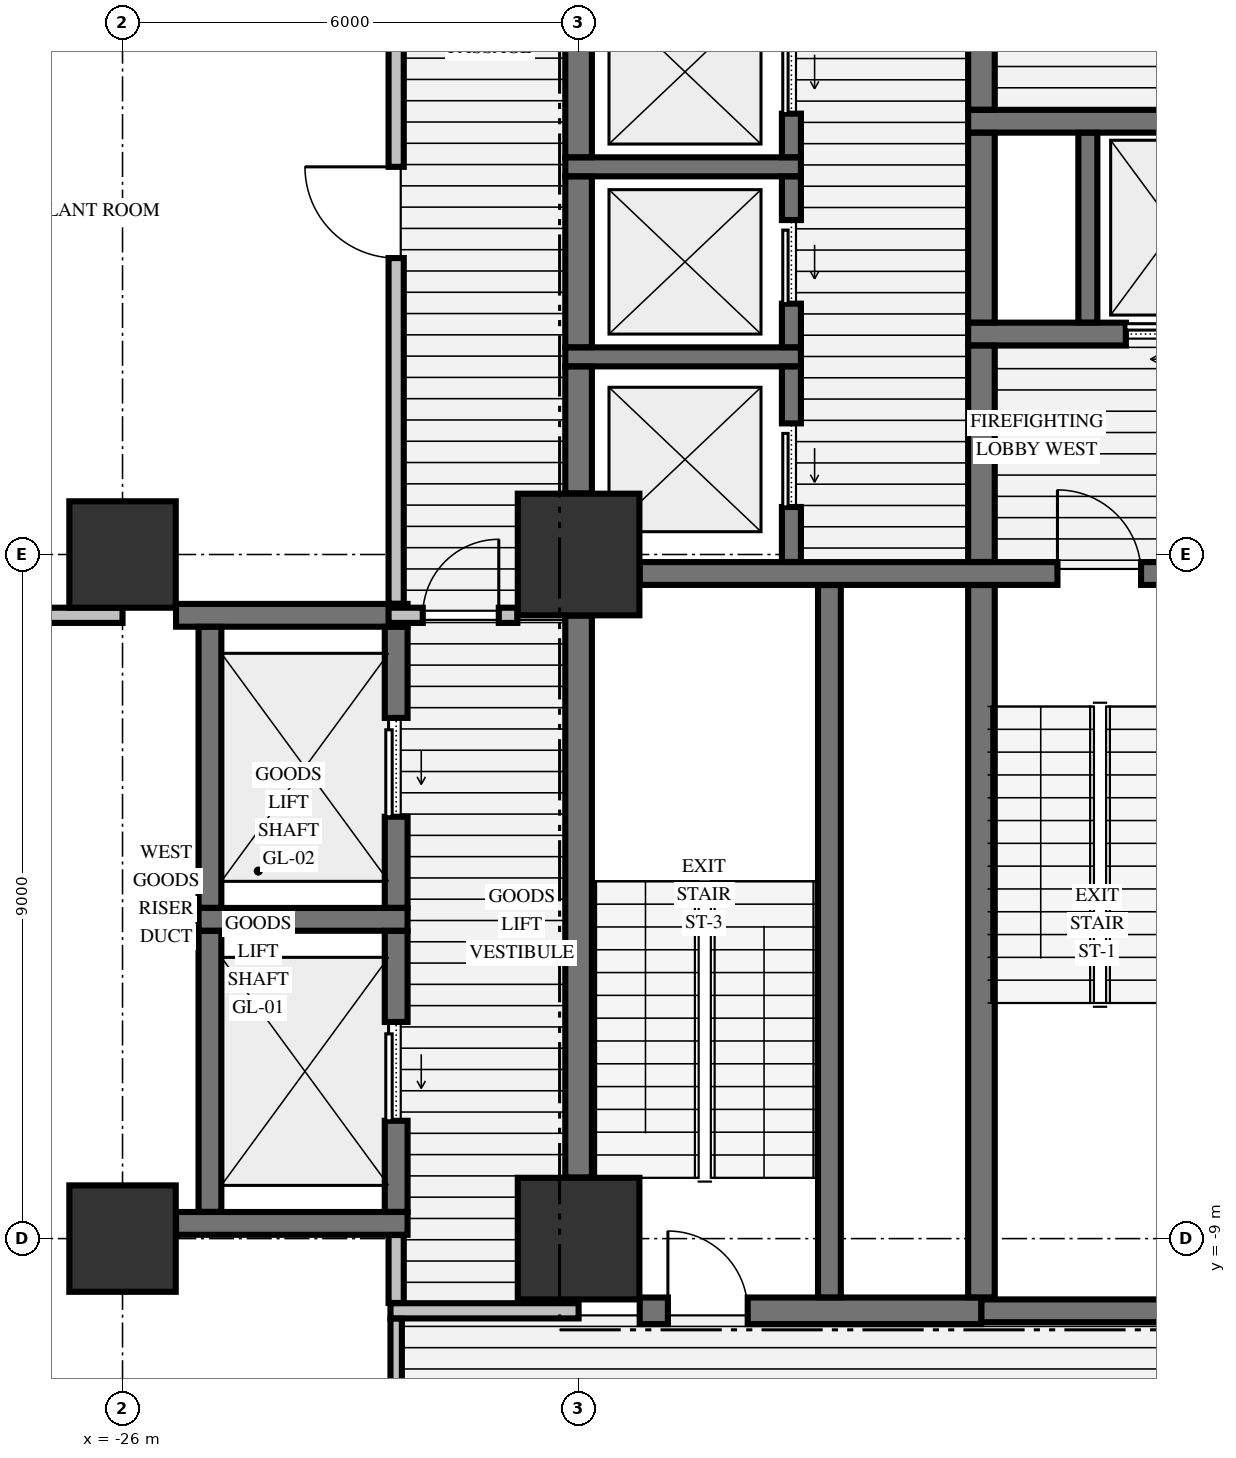
"""IFC4 building model, lengths in metres.
Left out: names, types, materials, properties, quantities, classifications, styles, units other than length and angle.
Written with IfcOpenShell. Run it as: python <this file> out.ifc"""

import sys

from ifc_helpers import new_model, si_unit, direction, frame, frame_2d, origin, origin_2d, place, context, subcontext, project, spatial, rectangle, extrude, element, fill, save


model = new_model("IFC4")
c1 = context("Model", 3, precision=1e-05, world=origin(), true_north=direction((0.0, 1.0)))
c2 = subcontext(c1, "Body", "Model", "MODEL_VIEW")
j1 = project(units=[si_unit("LENGTHUNIT", "METRE"), si_unit("PLANEANGLEUNIT", "RADIAN")], contexts=[c1])
p1 = place(None, origin())
s1 = spatial("IfcSite", under=j1, at=p1, CompositionType="ELEMENT")
p2 = place(p1, origin())
s2 = spatial("IfcBuilding", under=s1, at=p2, CompositionType="ELEMENT")
p3 = place(p2, frame((0.0, 0.0, -9.1)))
s3 = spatial("IfcBuildingStorey", under=s2, at=p3, CompositionType="ELEMENT", Elevation=-9.1)
for number, where, z_axis, x_axis in (
    (1, (-26.0, -9.0, -0.45), (0.0, 0.0, 1.0), (1.0, 0.0, 0.0)),
    (2, (-26.0, 0.0, -0.45), (0.0, 0.0, 1.0), (1.0, 0.0, 0.0)),
):
    element("IfcColumn", number, at=place(p3, frame(where, z_axis=z_axis, x_axis=x_axis)), inside=s3, PredefinedType="COLUMN", context=c2, shape_type="SweptSolid", body=[
        extrude(rectangle(XDim=1.4, YDim=1.4, at=origin_2d()), origin(), (0.0, 0.0, 1.0), 4.65),
    ])
for number, where, z_axis, x_axis in (
    (3, (-20.0, -9.0, -0.45), (0.0, 0.0, 1.0), (1.0, 0.0, 0.0)),
    (4, (-20.0, 0.0, -0.45), (0.0, 0.0, 1.0), (1.0, 0.0, 0.0)),
):
    element("IfcColumn", number, at=place(p3, frame(where, z_axis=z_axis, x_axis=x_axis)), inside=s3, PredefinedType="COLUMN", context=c2, shape_type="SweptSolid", body=[
        extrude(rectangle(XDim=1.6, YDim=1.6, at=origin_2d()), origin(), (0.0, 0.0, 1.0), 4.65),
    ])
p4 = place(p3, frame((-19.196, -9.95, 0.0), z_axis=(0.0, 0.0, 1.0), x_axis=(1.0, 0.0, 0.0)))
e5 = element("IfcWall", 5, at=p4, inside=s3, PredefinedType="SHEAR", context=c2, shape_type="SweptSolid", body=[
    extrude(rectangle(XDim=4.496, YDim=0.35, at=frame_2d((2.248, 0.0))), origin(), (0.0, 0.0, 1.0), 4.2),
])
p5 = place(p4, frame((0.371, 0.0, 0.0)))
e6 = element("IfcOpeningElement", 6, at=p5, cuts=e5, PredefinedType="OPENING", context=c2, shape_type="SweptSolid", body=[
    extrude(rectangle(XDim=1.05, YDim=2.15, at=frame_2d((0.525, 1.075))), frame((0.0, 0.185, 0.0), z_axis=(0.0, -1.0, 0.0), x_axis=(1.0, 0.0, 0.0)), (0.0, 0.0, 1.0), 0.37),
])
p6 = place(p3, frame((-14.7, -9.95, 0.0), z_axis=(0.0, 0.0, 1.0), x_axis=(1.0, 0.0, 0.0)))
e7 = element("IfcWall", 7, at=p6, inside=s3, PredefinedType="SHEAR", context=c2, shape_type="SweptSolid", body=[
    extrude(rectangle(XDim=3.85, YDim=0.3, at=frame_2d((1.925, 0.0))), origin(), (0.0, 0.0, 1.0), 4.2),
])
p7 = place(p3, frame((-25.296, -8.8, 0.0), z_axis=(0.0, 0.0, 1.0), x_axis=(1.0, 0.0, 0.0)))
e8 = element("IfcWall", 8, at=p7, inside=s3, PredefinedType="SHEAR", context=c2, shape_type="SweptSolid", body=[
    extrude(rectangle(XDim=3.046, YDim=0.3, at=frame_2d((1.523, 0.0))), origin(), (0.0, 0.0, 1.0), 4.2),
])
p8 = place(p3, frame((-25.0, -4.8, 0.0), z_axis=(0.0, 0.0, 1.0), x_axis=(1.0, 0.0, 0.0)))
e9 = element("IfcWall", 9, at=p8, inside=s3, PredefinedType="SHEAR", context=c2, shape_type="SweptSolid", body=[
    extrude(rectangle(XDim=2.75, YDim=0.3, at=frame_2d((1.375, 0.0))), origin(), (0.0, 0.0, 1.0), 4.2),
])
p9 = place(p3, frame((-25.296, -0.8, 0.0), z_axis=(0.0, 0.0, 1.0), x_axis=(1.0, 0.0, 0.0)))
e10 = element("IfcWall", 10, at=p9, inside=s3, PredefinedType="SHEAR", context=c2, shape_type="SweptSolid", body=[
    extrude(rectangle(XDim=3.046, YDim=0.3, at=frame_2d((1.523, 0.0))), origin(), (0.0, 0.0, 1.0), 4.2),
])
p10 = place(p3, frame((-19.196, -0.25, 0.0), z_axis=(0.0, 0.0, 1.0), x_axis=(1.0, 0.0, 0.0)))
e11 = element("IfcWall", 11, at=p10, inside=s3, PredefinedType="SHEAR", context=c2, shape_type="SweptSolid", body=[
    extrude(rectangle(XDim=7.392, YDim=0.3, at=frame_2d((3.696, 0.0))), origin(), (0.0, 0.0, 1.0), 4.2),
])
p11 = place(p10, frame((5.496, 0.0, 0.0)))
e12 = element("IfcOpeningElement", 12, at=p11, cuts=e11, PredefinedType="OPENING", context=c2, shape_type="SweptSolid", body=[
    extrude(rectangle(XDim=1.1, YDim=2.15, at=frame_2d((0.55, 1.075))), frame((0.0, 0.16, 0.0), z_axis=(0.0, -1.0, 0.0), x_axis=(1.0, 0.0, 0.0)), (0.0, 0.0, 1.0), 0.32),
])
p12 = place(p3, frame((-20.175, 2.6, 0.0), z_axis=(0.0, 0.0, 1.0), x_axis=(1.0, 0.0, 0.0)))
e13 = element("IfcWall", 13, at=p12, inside=s3, PredefinedType="SOLIDWALL", context=c2, shape_type="SweptSolid", body=[
    extrude(rectangle(XDim=3.1, YDim=0.25, at=frame_2d((1.55, 0.0))), origin(), (0.0, 0.0, 1.0), 4.2),
])
p13 = place(p3, frame((-14.875, 2.9, 0.0), z_axis=(0.0, 0.0, 1.0), x_axis=(1.0, 0.0, 0.0)))
e14 = element("IfcWall", 14, at=p13, inside=s3, PredefinedType="SHEAR", context=c2, shape_type="SweptSolid", body=[
    extrude(rectangle(XDim=4.025, YDim=0.3, at=frame_2d((2.012, 0.0))), origin(), (0.0, 0.0, 1.0), 4.2),
])
p14 = place(p13, frame((2.075, 0.0, 0.0)))
e15 = element("IfcOpeningElement", 15, at=p14, cuts=e14, PredefinedType="OPENING", context=c2, shape_type="SweptSolid", body=[
    extrude(rectangle(XDim=1.1, YDim=2.2, at=frame_2d((0.55, 1.1))), frame((0.0, 0.16, 0.0), z_axis=(0.0, -1.0, 0.0), x_axis=(1.0, 0.0, 0.0)), (0.0, 0.0, 1.0), 0.32),
])
p15 = place(p3, frame((-20.175, 5.1, 0.0), z_axis=(0.0, 0.0, 1.0), x_axis=(1.0, 0.0, 0.0)))
e16 = element("IfcWall", 16, at=p15, inside=s3, PredefinedType="SOLIDWALL", context=c2, shape_type="SweptSolid", body=[
    extrude(rectangle(XDim=3.1, YDim=0.25, at=frame_2d((1.55, 0.0))), origin(), (0.0, 0.0, 1.0), 4.2),
])
p16 = place(p3, frame((-14.875, 5.7, 0.0), z_axis=(0.0, 0.0, 1.0), x_axis=(1.0, 0.0, 0.0)))
e17 = element("IfcWall", 17, at=p16, inside=s3, PredefinedType="SHEAR", context=c2, shape_type="SweptSolid", body=[
    extrude(rectangle(XDim=4.025, YDim=0.3, at=frame_2d((2.012, 0.0))), origin(), (0.0, 0.0, 1.0), 4.2),
])
p17 = place(p3, frame((-22.475, -9.95, 0.0), z_axis=(0.0, 0.0, 1.0), x_axis=(1.0, 0.0, 0.0)))
e18 = element("IfcWall", 18, at=p17, inside=s3, PredefinedType="PARTITIONING", context=c2, shape_type="SweptSolid", body=[
    extrude(rectangle(XDim=2.475, YDim=0.2, at=frame_2d((1.238, 0.0))), origin(), (0.0, 0.0, 1.0), 4.2),
])
p18 = place(p3, frame((-33.722, -0.8, 0.0), z_axis=(0.0, 0.0, 1.0), x_axis=(1.0, 0.0, 0.0)))
e19 = element("IfcWall", 19, at=p18, inside=s3, PredefinedType="PARTITIONING", context=c2, shape_type="SweptSolid", body=[
    extrude(rectangle(XDim=7.722, YDim=0.2, at=frame_2d((3.861, 0.0))), origin(), (0.0, 0.0, 1.0), 4.2),
])
p19 = place(p3, frame((-22.5, -0.8, 0.0), z_axis=(0.0, 0.0, 1.0), x_axis=(1.0, 0.0, 0.0)))
e20 = element("IfcWall", 20, at=p19, inside=s3, PredefinedType="PARTITIONING", context=c2, shape_type="SweptSolid", body=[
    extrude(rectangle(XDim=1.694, YDim=0.2, at=frame_2d((0.847, 0.0))), origin(), (0.0, 0.0, 1.0), 4.2),
])
p20 = place(p19, frame((0.45, 0.0, 0.0)))
e21 = element("IfcOpeningElement", 21, at=p20, cuts=e20, PredefinedType="OPENING", context=c2, shape_type="SweptSolid", body=[
    extrude(rectangle(XDim=1.0, YDim=2.15, at=frame_2d((0.5, 1.075))), frame((0.0, 0.11, 0.0), z_axis=(0.0, -1.0, 0.0), x_axis=(1.0, 0.0, 0.0)), (0.0, 0.0, 1.0), 0.22),
])
for number, where, z_axis, x_axis in (
    (22, (-24.85, -8.648, 0.0), (0.0, 0.0, 1.0), (0.0, 1.0, 0.0)),
    (23, (-24.85, -4.648, 0.0), (0.0, 0.0, 1.0), (0.0, 1.0, 0.0)),
):
    element("IfcWall", number, at=place(p3, frame(where, z_axis=z_axis, x_axis=x_axis)), inside=s3, PredefinedType="SHEAR", context=c2, shape_type="SweptSolid", body=[
        extrude(rectangle(XDim=3.696, YDim=0.3, at=frame_2d((1.848, 0.0))), origin(), (0.0, 0.0, 1.0), 4.2),
    ])
p21 = place(p3, frame((-22.4, -8.648, 0.0), z_axis=(0.0, 0.0, 1.0), x_axis=(0.0, 1.0, 0.0)))
e24 = element("IfcWall", 24, at=p21, inside=s3, PredefinedType="SHEAR", context=c2, shape_type="SweptSolid", body=[
    extrude(rectangle(XDim=3.696, YDim=0.3, at=frame_2d((1.848, 0.0))), origin(), (0.0, 0.0, 1.0), 4.2),
])
p22 = place(p21, frame((1.198, 0.0, 0.0)))
e25 = element("IfcOpeningElement", 25, at=p22, cuts=e24, PredefinedType="OPENING", context=c2, shape_type="SweptSolid", body=[
    extrude(rectangle(XDim=1.3, YDim=2.3, at=frame_2d((0.65, 1.15))), frame((0.0, 0.16, 0.0), z_axis=(0.0, -1.0, 0.0), x_axis=(1.0, 0.0, 0.0)), (0.0, 0.0, 1.0), 0.32),
])
p23 = place(p3, frame((-22.4, -4.648, 0.0), z_axis=(0.0, 0.0, 1.0), x_axis=(0.0, 1.0, 0.0)))
e26 = element("IfcWall", 26, at=p23, inside=s3, PredefinedType="SHEAR", context=c2, shape_type="SweptSolid", body=[
    extrude(rectangle(XDim=3.696, YDim=0.3, at=frame_2d((1.848, 0.0))), origin(), (0.0, 0.0, 1.0), 4.2),
])
p24 = place(p23, frame((1.198, 0.0, 0.0)))
e27 = element("IfcOpeningElement", 27, at=p24, cuts=e26, PredefinedType="OPENING", context=c2, shape_type="SweptSolid", body=[
    extrude(rectangle(XDim=1.3, YDim=2.3, at=frame_2d((0.65, 1.15))), frame((0.0, 0.16, 0.0), z_axis=(0.0, -1.0, 0.0), x_axis=(1.0, 0.0, 0.0)), (0.0, 0.0, 1.0), 0.32),
])
p25 = place(p3, frame((-20.0, -8.196, 0.0), z_axis=(0.0, 0.0, 1.0), x_axis=(0.0, 1.0, 0.0)))
e28 = element("IfcWall", 28, at=p25, inside=s3, PredefinedType="SHEAR", context=c2, shape_type="SweptSolid", body=[
    extrude(rectangle(XDim=7.392, YDim=0.35, at=frame_2d((3.696, 0.0))), origin(), (0.0, 0.0, 1.0), 4.2),
])
p26 = place(p3, frame((-20.0, 0.804, 0.0), z_axis=(0.0, 0.0, 1.0), x_axis=(0.0, 1.0, 0.0)))
e29 = element("IfcWall", 29, at=p26, inside=s3, PredefinedType="SHEAR", context=c2, shape_type="SweptSolid", body=[
    extrude(rectangle(XDim=1.669, YDim=0.35, at=frame_2d((0.834, 0.0))), origin(), (0.0, 0.0, 1.0), 4.2),
])
for number, where, z_axis, x_axis in (
    (30, (-20.0, 2.727, 0.0), (0.0, 0.0, 1.0), (0.0, 1.0, 0.0)),
    (31, (-20.0, 5.227, 0.0), (0.0, 0.0, 1.0), (0.0, 1.0, 0.0)),
):
    element("IfcWall", number, at=place(p3, frame(where, z_axis=z_axis, x_axis=x_axis)), inside=s3, PredefinedType="SHEAR", context=c2, shape_type="SweptSolid", body=[
        extrude(rectangle(XDim=2.246, YDim=0.35, at=frame_2d((1.123, 0.0))), origin(), (0.0, 0.0, 1.0), 4.2),
    ])
p27 = place(p3, frame((-17.2, -0.098, 0.0), z_axis=(0.0, 0.0, 1.0), x_axis=(0.0, 1.0, 0.0)))
e32 = element("IfcWall", 32, at=p27, inside=s3, PredefinedType="SOLIDWALL", context=c2, shape_type="SweptSolid", body=[
    extrude(rectangle(XDim=2.571, YDim=0.25, at=frame_2d((1.285, 0.0))), origin(), (0.0, 0.0, 1.0), 4.2),
])
p28 = place(p27, frame((0.723, 0.0, 0.0)))
e33 = element("IfcOpeningElement", 33, at=p28, cuts=e32, PredefinedType="OPENING", context=c2, shape_type="SweptSolid", body=[
    extrude(rectangle(XDim=1.1, YDim=2.2, at=frame_2d((0.55, 1.1))), frame((0.0, 0.135, 0.0), z_axis=(0.0, -1.0, 0.0), x_axis=(1.0, 0.0, 0.0)), (0.0, 0.0, 1.0), 0.27),
])
p29 = place(p3, frame((-17.2, 2.727, 0.0), z_axis=(0.0, 0.0, 1.0), x_axis=(0.0, 1.0, 0.0)))
e34 = element("IfcWall", 34, at=p29, inside=s3, PredefinedType="SOLIDWALL", context=c2, shape_type="SweptSolid", body=[
    extrude(rectangle(XDim=2.246, YDim=0.25, at=frame_2d((1.123, 0.0))), origin(), (0.0, 0.0, 1.0), 4.2),
])
p30 = place(p29, frame((0.573, 0.0, 0.0)))
e35 = element("IfcOpeningElement", 35, at=p30, cuts=e34, PredefinedType="OPENING", context=c2, shape_type="SweptSolid", body=[
    extrude(rectangle(XDim=1.1, YDim=2.2, at=frame_2d((0.55, 1.1))), frame((0.0, 0.135, 0.0), z_axis=(0.0, -1.0, 0.0), x_axis=(1.0, 0.0, 0.0)), (0.0, 0.0, 1.0), 0.27),
])
p31 = place(p3, frame((-17.2, 5.227, 0.0), z_axis=(0.0, 0.0, 1.0), x_axis=(0.0, 1.0, 0.0)))
e36 = element("IfcWall", 36, at=p31, inside=s3, PredefinedType="SOLIDWALL", context=c2, shape_type="SweptSolid", body=[
    extrude(rectangle(XDim=2.246, YDim=0.25, at=frame_2d((1.123, 0.0))), origin(), (0.0, 0.0, 1.0), 4.2),
])
p32 = place(p31, frame((0.573, 0.0, 0.0)))
e37 = element("IfcOpeningElement", 37, at=p32, cuts=e36, PredefinedType="OPENING", context=c2, shape_type="SweptSolid", body=[
    extrude(rectangle(XDim=1.1, YDim=2.2, at=frame_2d((0.55, 1.1))), frame((0.0, 0.135, 0.0), z_axis=(0.0, -1.0, 0.0), x_axis=(1.0, 0.0, 0.0)), (0.0, 0.0, 1.0), 0.27),
])
p33 = place(p3, frame((-16.7, -9.773, 0.0), z_axis=(0.0, 0.0, 1.0), x_axis=(0.0, 1.0, 0.0)))
e38 = element("IfcWall", 38, at=p33, inside=s3, PredefinedType="SHEAR", context=c2, shape_type="SweptSolid", body=[
    extrude(rectangle(XDim=9.371, YDim=0.3, at=frame_2d((4.686, 0.0))), origin(), (0.0, 0.0, 1.0), 4.2),
])
p34 = place(p3, frame((-14.7, -9.773, 0.0), z_axis=(0.0, 0.0, 1.0), x_axis=(0.0, 1.0, 0.0)))
e39 = element("IfcWall", 39, at=p34, inside=s3, PredefinedType="SHEAR", context=c2, shape_type="SweptSolid", body=[
    extrude(rectangle(XDim=9.371, YDim=0.35, at=frame_2d((4.686, 0.0))), origin(), (0.0, 0.0, 1.0), 4.2),
])
p35 = place(p3, frame((-14.7, -0.098, 0.0), z_axis=(0.0, 0.0, 1.0), x_axis=(0.0, 1.0, 0.0)))
e40 = element("IfcWall", 40, at=p35, inside=s3, PredefinedType="SHEAR", context=c2, shape_type="SweptSolid", body=[
    extrude(rectangle(XDim=2.846, YDim=0.35, at=frame_2d((1.423, 0.0))), origin(), (0.0, 0.0, 1.0), 4.2),
])
p36 = place(p3, frame((-14.7, 3.052, 0.0), z_axis=(0.0, 0.0, 1.0), x_axis=(0.0, 1.0, 0.0)))
e41 = element("IfcWall", 41, at=p36, inside=s3, PredefinedType="SHEAR", context=c2, shape_type="SweptSolid", body=[
    extrude(rectangle(XDim=2.496, YDim=0.35, at=frame_2d((1.248, 0.0))), origin(), (0.0, 0.0, 1.0), 4.2),
])
p37 = place(p3, frame((-14.7, 5.852, 0.0), z_axis=(0.0, 0.0, 1.0), x_axis=(0.0, 1.0, 0.0)))
e42 = element("IfcWall", 42, at=p37, inside=s3, PredefinedType="SHEAR", context=c2, shape_type="SweptSolid", body=[
    extrude(rectangle(XDim=4.471, YDim=0.35, at=frame_2d((2.235, 0.0))), origin(), (0.0, 0.0, 1.0), 4.2),
])
p38 = place(p3, frame((-13.3, 3.052, 0.0), z_axis=(0.0, 0.0, 1.0), x_axis=(0.0, 1.0, 0.0)))
e43 = element("IfcWall", 43, at=p38, inside=s3, PredefinedType="SOLIDWALL", context=c2, shape_type="SweptSolid", body=[
    extrude(rectangle(XDim=2.496, YDim=0.25, at=frame_2d((1.248, 0.0))), origin(), (0.0, 0.0, 1.0), 4.2),
])
p39 = place(p3, frame((-22.4, -12.522, 0.0), z_axis=(0.0, 0.0, 1.0), x_axis=(0.0, 1.0, 0.0)))
e44 = element("IfcWall", 44, at=p39, inside=s3, PredefinedType="PARTITIONING", context=c2, shape_type="SweptSolid", body=[
    extrude(rectangle(XDim=2.469, YDim=0.15, at=frame_2d((1.234, 0.0))), origin(), (0.0, 0.0, 1.0), 4.2),
])
p40 = place(p3, frame((-22.4, -9.847, 0.0), z_axis=(0.0, 0.0, 1.0), x_axis=(0.0, 1.0, 0.0)))
e45 = element("IfcWall", 45, at=p40, inside=s3, PredefinedType="PARTITIONING", context=c2, shape_type="SweptSolid", body=[
    extrude(rectangle(XDim=0.894, YDim=0.2, at=frame_2d((0.447, 0.0))), origin(), (0.0, 0.0, 1.0), 4.2),
])
p41 = place(p3, frame((-22.4, -0.647, 0.0), z_axis=(0.0, 0.0, 1.0), x_axis=(0.0, 1.0, 0.0)))
e46 = element("IfcWall", 46, at=p41, inside=s3, PredefinedType="PARTITIONING", context=c2, shape_type="SweptSolid", body=[
    extrude(rectangle(XDim=11.069, YDim=0.2, at=frame_2d((5.535, 0.0))), origin(), (0.0, 0.0, 1.0), 4.2),
])
p42 = place(p41, frame((4.547, 0.0, 0.0)))
e47 = element("IfcOpeningElement", 47, at=p42, cuts=e46, PredefinedType="OPENING", context=c2, shape_type="SweptSolid", body=[
    extrude(rectangle(XDim=1.2, YDim=2.15, at=frame_2d((0.6, 1.075))), frame((0.0, 0.11, 0.0), z_axis=(0.0, -1.0, 0.0), x_axis=(1.0, 0.0, 0.0)), (0.0, 0.0, 1.0), 0.22),
])
p43 = place(p11, origin())
e48 = element("IfcDoor", 48, at=p43, inside=s3, OperationType="SINGLE_SWING_LEFT", PredefinedType="DOOR", context=c2, shape_type="SweptSolid", body=[
    extrude(rectangle(XDim=1.1, YDim=2.15, at=frame_2d((0.55, 1.075))), frame((0.0, 0.025, 0.0), z_axis=(0.0, -1.0, 0.0), x_axis=(1.0, 0.0, 0.0)), (0.0, 0.0, 1.0), 0.05),
])
fill(e12, e48)
p44 = place(p14, origin())
e49 = element("IfcDoor", 49, at=p44, inside=s3, OperationType="SLIDING_TO_LEFT", PredefinedType="DOOR", context=c2, shape_type="SweptSolid", body=[
    extrude(rectangle(XDim=1.1, YDim=2.2, at=frame_2d((0.55, 1.1))), frame((0.0, 0.025, 0.0), z_axis=(0.0, -1.0, 0.0), x_axis=(1.0, 0.0, 0.0)), (0.0, 0.0, 1.0), 0.05),
])
fill(e15, e49)
p45 = place(p5, origin())
e50 = element("IfcDoor", 50, at=p45, inside=s3, OperationType="SINGLE_SWING_LEFT", PredefinedType="DOOR", context=c2, shape_type="SweptSolid", body=[
    extrude(rectangle(XDim=1.05, YDim=2.15, at=frame_2d((0.525, 1.075))), frame((0.0, 0.025, 0.0), z_axis=(0.0, -1.0, 0.0), x_axis=(1.0, 0.0, 0.0)), (0.0, 0.0, 1.0), 0.05),
])
fill(e6, e50)
p46 = place(p28, origin())
e51 = element("IfcDoor", 51, at=p46, inside=s3, OperationType="SLIDING_TO_LEFT", PredefinedType="DOOR", context=c2, shape_type="SweptSolid", body=[
    extrude(rectangle(XDim=1.1, YDim=2.2, at=frame_2d((0.55, 1.1))), frame((0.0, 0.025, 0.0), z_axis=(0.0, -1.0, 0.0), x_axis=(1.0, 0.0, 0.0)), (0.0, 0.0, 1.0), 0.05),
])
fill(e33, e51)
p47 = place(p30, origin())
e52 = element("IfcDoor", 52, at=p47, inside=s3, OperationType="SLIDING_TO_LEFT", PredefinedType="DOOR", context=c2, shape_type="SweptSolid", body=[
    extrude(rectangle(XDim=1.1, YDim=2.2, at=frame_2d((0.55, 1.1))), frame((0.0, 0.025, 0.0), z_axis=(0.0, -1.0, 0.0), x_axis=(1.0, 0.0, 0.0)), (0.0, 0.0, 1.0), 0.05),
])
fill(e35, e52)
p48 = place(p32, origin())
e53 = element("IfcDoor", 53, at=p48, inside=s3, OperationType="SLIDING_TO_LEFT", PredefinedType="DOOR", context=c2, shape_type="SweptSolid", body=[
    extrude(rectangle(XDim=1.1, YDim=2.2, at=frame_2d((0.55, 1.1))), frame((0.0, 0.025, 0.0), z_axis=(0.0, -1.0, 0.0), x_axis=(1.0, 0.0, 0.0)), (0.0, 0.0, 1.0), 0.05),
])
fill(e37, e53)
p49 = place(p22, origin())
e54 = element("IfcDoor", 54, at=p49, inside=s3, OperationType="SLIDING_TO_LEFT", PredefinedType="DOOR", context=c2, shape_type="SweptSolid", body=[
    extrude(rectangle(XDim=1.3, YDim=2.3, at=frame_2d((0.65, 1.15))), frame((0.0, 0.025, 0.0), z_axis=(0.0, -1.0, 0.0), x_axis=(1.0, 0.0, 0.0)), (0.0, 0.0, 1.0), 0.05),
])
fill(e25, e54)
p50 = place(p24, origin())
e55 = element("IfcDoor", 55, at=p50, inside=s3, OperationType="SLIDING_TO_LEFT", PredefinedType="DOOR", context=c2, shape_type="SweptSolid", body=[
    extrude(rectangle(XDim=1.3, YDim=2.3, at=frame_2d((0.65, 1.15))), frame((0.0, 0.025, 0.0), z_axis=(0.0, -1.0, 0.0), x_axis=(1.0, 0.0, 0.0)), (0.0, 0.0, 1.0), 0.05),
])
fill(e27, e55)
p51 = place(p20, origin())
e56 = element("IfcDoor", 56, at=p51, inside=s3, OperationType="SINGLE_SWING_RIGHT", PredefinedType="DOOR", context=c2, shape_type="SweptSolid", body=[
    extrude(rectangle(XDim=1.0, YDim=2.15, at=frame_2d((0.5, 1.075))), frame((0.0, 0.025, 0.0), z_axis=(0.0, -1.0, 0.0), x_axis=(1.0, 0.0, 0.0)), (0.0, 0.0, 1.0), 0.05),
])
fill(e21, e56)
p52 = place(p42, origin())
e57 = element("IfcDoor", 57, at=p52, inside=s3, OperationType="SINGLE_SWING_RIGHT", PredefinedType="DOOR", context=c2, shape_type="SweptSolid", body=[
    extrude(rectangle(XDim=1.2, YDim=2.15, at=frame_2d((0.6, 1.075))), frame((0.0, 0.025, 0.0), z_axis=(0.0, -1.0, 0.0), x_axis=(1.0, 0.0, 0.0)), (0.0, 0.0, 1.0), 0.05),
])
fill(e47, e57)
save(model, sys.argv[1])
